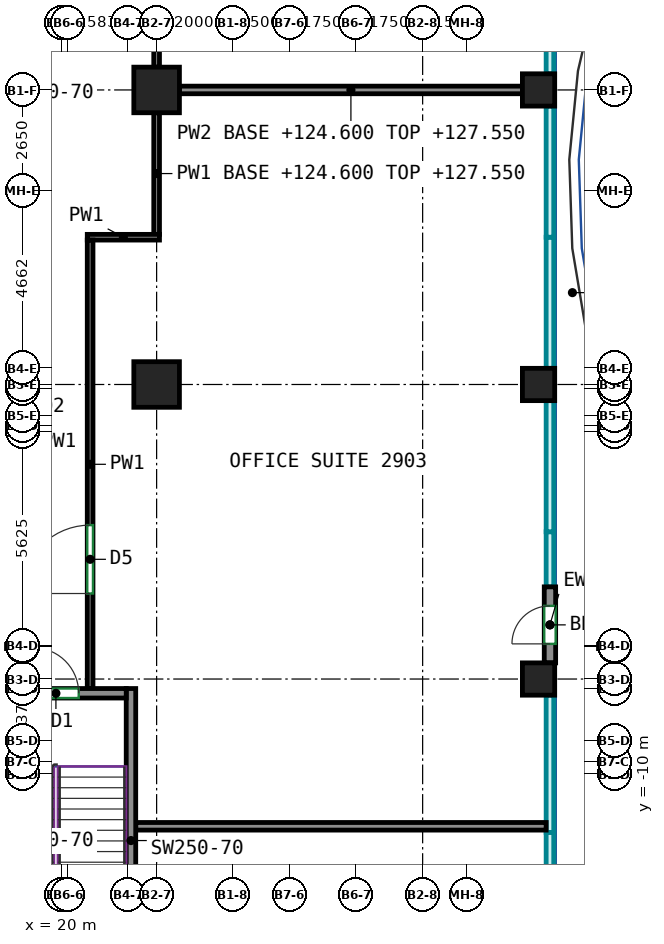
"""IFC4 building model, lengths in metres.
Left out: names, types, materials, properties, quantities, classifications, styles, units other than length and angle.
Written with IfcOpenShell. Run it as: python <this file> out.ifc"""

import sys

from ifc_helpers import new_model, si_unit, direction, frame, frame_2d, origin, origin_2d, place, context, subcontext, project, spatial, rectangle, extrude, source, transform, mapped, element, fill, save


model = new_model("IFC4")
c1 = context("Model", 3, precision=1e-05, world=origin(), true_north=direction((0.0, 1.0)))
c2 = subcontext(c1, "Body", "Model", "MODEL_VIEW")
j1 = project(units=[si_unit("LENGTHUNIT", "METRE"), si_unit("PLANEANGLEUNIT", "RADIAN")], contexts=[c1])
p1 = place(None, origin())
s1 = spatial("IfcSite", under=j1, at=p1, CompositionType="ELEMENT")
p2 = place(p1, origin())
s2 = spatial("IfcBuilding", under=s1, at=p2, CompositionType="ELEMENT")
p3 = place(p2, frame((0.0, 0.0, 124.6)))
s3 = spatial("IfcBuildingStorey", under=s2, at=p3, CompositionType="ELEMENT", Elevation=124.6)
m1 = source(origin(), c2, "Body", "SweptSolid", [
    extrude(rectangle(XDim=1.2, YDim=1.2, at=origin_2d()), origin(), (0.0, 0.0, 1.0), 3.6),
])
for number, where, z_axis, x_axis in (
    (1, (22.5, 0.25, 0.0), (0.0, 0.0, 1.0), (1.0, 0.0, 0.0)),
    (2, (22.5, 8.0, 0.0), (0.0, 0.0, 1.0), (1.0, 0.0, 0.0)),
):
    element("IfcColumn", number, at=place(p3, frame(where, z_axis=z_axis, x_axis=x_axis)), inside=s3, PredefinedType="COLUMN", context=c2, shape_type="MappedRepresentation", body=[
        mapped(m1, transform((0.0, 0.0, 0.0))),
    ])
m2 = source(origin(), c2, "Body", "SweptSolid", [
    extrude(rectangle(XDim=0.85, YDim=0.85, at=origin_2d()), origin(), (0.0, 0.0, 1.0), 3.6),
])
for number, where, z_axis, x_axis in (
    (3, (32.55, -7.5, 0.0), (0.0, 0.0, 1.0), (1.0, 0.0, 0.0)),
    (4, (32.55, 0.25, 0.0), (0.0, 0.0, 1.0), (1.0, 0.0, 0.0)),
    (5, (32.55, 8.0, 0.0), (0.0, 0.0, 1.0), (1.0, 0.0, 0.0)),
):
    element("IfcColumn", number, at=place(p3, frame(where, z_axis=z_axis, x_axis=x_axis)), inside=s3, PredefinedType="COLUMN", context=c2, shape_type="MappedRepresentation", body=[
        mapped(m2, transform((0.0, 0.0, 0.0))),
    ])
m3 = source(origin(), c2, "Body", "SweptSolid", [
    extrude(rectangle(XDim=8.0, YDim=0.25, at=frame_2d((4.0, 0.0))), origin(), (0.0, 0.0, 1.0), 3.6),
])
p4 = place(p3, frame((21.825, -15.75, 0.0), z_axis=(0.0, 0.0, 1.0), x_axis=(0.0, 1.0, 0.0)))
e6 = element("IfcWall", 6, at=p4, inside=s3, PredefinedType="SHEAR", context=c2, shape_type="MappedRepresentation", body=[
    mapped(m3, transform((0.0, 0.0, 0.0))),
])
m4 = source(origin(), c2, "Body", "SweptSolid", [
    extrude(rectangle(XDim=3.7, YDim=0.25, at=frame_2d((1.85, 0.0))), origin(), (0.0, 0.0, 1.0), 3.6),
])
p5 = place(p3, frame((18.0, -7.875, 0.0), z_axis=(0.0, 0.0, 1.0), x_axis=(1.0, 0.0, 0.0)))
e7 = element("IfcWall", 7, at=p5, inside=s3, PredefinedType="SHEAR", context=c2, shape_type="MappedRepresentation", body=[
    mapped(m4, transform((0.0, 0.0, 0.0))),
])
p6 = place(p5, frame((1.25, 0.0, 0.0)))
e8 = element("IfcOpeningElement", 8, at=p6, cuts=e7, PredefinedType="OPENING", context=c2, shape_type="SweptSolid", body=[
    extrude(rectangle(XDim=1.2, YDim=2.1, at=frame_2d((0.6, 1.05))), frame((0.0, 0.135, 0.0), z_axis=(0.0, -1.0, 0.0), x_axis=(1.0, 0.0, 0.0)), (0.0, 0.0, 1.0), 0.27),
])
m5 = source(origin(), c2, "Body", "SweptSolid", [
    extrude(rectangle(XDim=2.0, YDim=0.3, at=frame_2d((1.0, 0.0))), origin(), (0.0, 0.0, 1.0), 3.6),
])
p7 = place(p3, frame((32.85, -7.075, 0.0), z_axis=(0.0, 0.0, 1.0), x_axis=(0.0, 1.0, 0.0)))
e9 = element("IfcWall", 9, at=p7, inside=s3, PredefinedType="SOLIDWALL", context=c2, shape_type="MappedRepresentation", body=[
    mapped(m5, transform((0.0, 0.0, 0.0))),
])
p8 = place(p7, frame((0.5, 0.0, 0.0)))
e10 = element("IfcOpeningElement", 10, at=p8, cuts=e9, PredefinedType="OPENING", context=c2, shape_type="SweptSolid", body=[
    extrude(rectangle(XDim=1.0, YDim=2.1, at=frame_2d((0.5, 1.05))), frame((0.0, 0.16, 0.0), z_axis=(0.0, -1.0, 0.0), x_axis=(1.0, 0.0, 0.0)), (0.0, 0.0, 1.0), 0.32),
])
p9 = place(p3, frame((22.5, 4.2, 0.0), z_axis=(0.0, 0.0, 1.0), x_axis=(0.0, 1.0, 0.0)))
e11 = element("IfcWall", 11, at=p9, inside=s3, PredefinedType="PARTITIONING", context=c2, shape_type="SweptSolid", body=[
    extrude(rectangle(XDim=3.2, YDim=0.15, at=frame_2d((1.6, 0.0))), origin(), (0.0, 0.0, 1.0), 2.95),
])
p10 = place(p3, frame((20.675, 4.125, 0.0), z_axis=(0.0, 0.0, 1.0), x_axis=(1.0, 0.0, 0.0)))
e12 = element("IfcWall", 12, at=p10, inside=s3, PredefinedType="PARTITIONING", context=c2, shape_type="SweptSolid", body=[
    extrude(rectangle(XDim=1.9, YDim=0.15, at=frame_2d((0.95, 0.0))), origin(), (0.0, 0.0, 1.0), 3.6),
])
p11 = place(p3, frame((20.75, -7.75, 0.0), z_axis=(0.0, 0.0, 1.0), x_axis=(0.0, 1.0, 0.0)))
e13 = element("IfcWall", 13, at=p11, inside=s3, PredefinedType="PARTITIONING", context=c2, shape_type="SweptSolid", body=[
    extrude(rectangle(XDim=11.8, YDim=0.15, at=frame_2d((5.9, 0.0))), origin(), (0.0, 0.0, 1.0), 3.6),
])
p12 = place(p11, frame((2.5, 0.0, 0.0)))
e14 = element("IfcOpeningElement", 14, at=p12, cuts=e13, PredefinedType="OPENING", context=c2, shape_type="SweptSolid", body=[
    extrude(rectangle(XDim=1.8, YDim=2.1, at=frame_2d((0.9, 1.05))), frame((0.0, 0.085, 0.0), z_axis=(0.0, -1.0, 0.0), x_axis=(1.0, 0.0, 0.0)), (0.0, 0.0, 1.0), 0.17),
])
p13 = place(p3, frame((22.5, 8.6, 0.0), z_axis=(0.0, 0.0, 1.0), x_axis=(0.0, 1.0, 0.0)))
e15 = element("IfcWall", 15, at=p13, inside=s3, PredefinedType="PARTITIONING", context=c2, shape_type="SweptSolid", body=[
    extrude(rectangle(XDim=1.25, YDim=0.15, at=frame_2d((0.625, 0.0))), origin(), (0.0, 0.0, 1.0), 2.95),
])
p14 = place(p3, frame((21.95, -11.375, 0.0), z_axis=(0.0, 0.0, 1.0), x_axis=(1.0, 0.0, 0.0)))
e16 = element("IfcWall", 16, at=p14, inside=s3, PredefinedType="PARTITIONING", context=c2, shape_type="SweptSolid", body=[
    extrude(rectangle(XDim=10.8, YDim=0.2, at=frame_2d((5.4, 0.0))), origin(), (0.0, 0.0, 1.0), 3.6),
])
p15 = place(p3, frame((23.1, 8.0, 0.0), z_axis=(0.0, 0.0, 1.0), x_axis=(1.0, 0.0, 0.0)))
e17 = element("IfcWall", 17, at=p15, inside=s3, PredefinedType="PARTITIONING", context=c2, shape_type="SweptSolid", body=[
    extrude(rectangle(XDim=9.025, YDim=0.2, at=frame_2d((4.512, 0.0))), origin(), (0.0, 0.0, 1.0), 2.95),
])
p16 = place(p8, origin())
e18 = element("IfcDoor", 18, at=p16, inside=s3, OperationType="SINGLE_SWING_LEFT", PredefinedType="DOOR", context=c2, shape_type="SweptSolid", body=[
    extrude(rectangle(XDim=1.0, YDim=2.1, at=frame_2d((0.5, 1.05))), frame((0.0, 0.025, 0.0), z_axis=(0.0, -1.0, 0.0), x_axis=(1.0, 0.0, 0.0)), (0.0, 0.0, 1.0), 0.05),
])
fill(e10, e18)
p17 = place(p6, origin())
e19 = element("IfcDoor", 19, at=p17, inside=s3, OperationType="DOUBLE_DOOR_SINGLE_SWING", PredefinedType="DOOR", context=c2, shape_type="SweptSolid", body=[
    extrude(rectangle(XDim=1.2, YDim=2.1, at=frame_2d((0.6, 1.05))), frame((0.0, 0.025, 0.0), z_axis=(0.0, -1.0, 0.0), x_axis=(1.0, 0.0, 0.0)), (0.0, 0.0, 1.0), 0.05),
])
fill(e8, e19)
p18 = place(p12, origin())
e20 = element("IfcDoor", 20, at=p18, inside=s3, OperationType="DOUBLE_DOOR_SINGLE_SWING", PredefinedType="DOOR", context=c2, shape_type="SweptSolid", body=[
    extrude(rectangle(XDim=1.8, YDim=2.1, at=frame_2d((0.9, 1.05))), frame((0.0, 0.025, 0.0), z_axis=(0.0, -1.0, 0.0), x_axis=(1.0, 0.0, 0.0)), (0.0, 0.0, 1.0), 0.05),
])
fill(e14, e20)
save(model, sys.argv[1])
